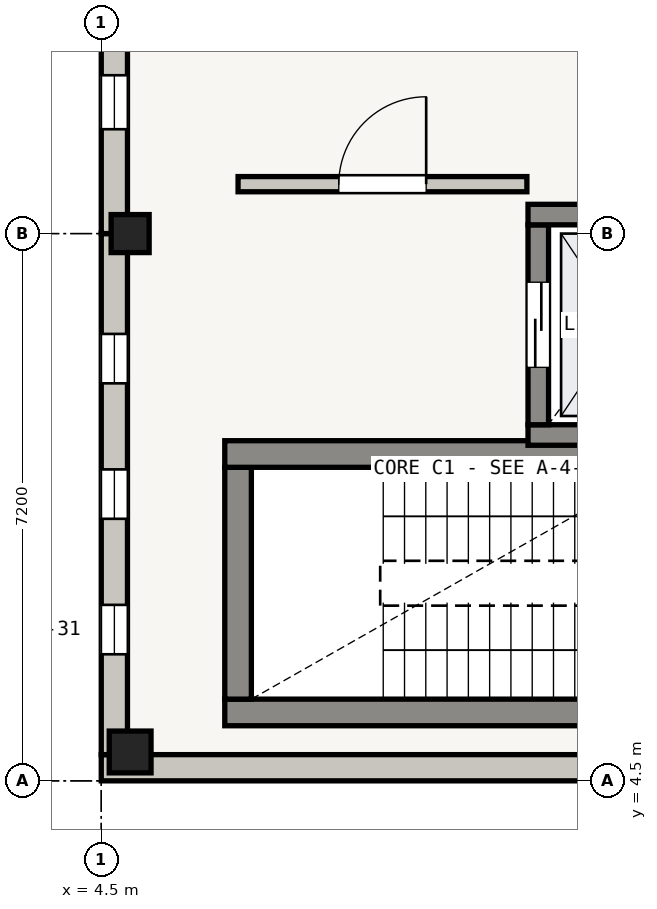
"""IFC4 building model, lengths in metres.
Left out: names, types, materials, properties, quantities, classifications, styles, units other than length and angle.
Written with IfcOpenShell. Run it as: python <this file> out.ifc"""

import sys

from ifc_helpers import new_model, si_unit, direction, frame, frame_2d, origin, origin_2d, place, context, subcontext, project, spatial, rectangle, extrude, element, fill, save


model = new_model("IFC4")
c1 = context("Model", 3, precision=1e-05, world=origin(), true_north=direction((0.0, 1.0)))
c2 = subcontext(c1, "Body", "Model", "MODEL_VIEW")
j1 = project(units=[si_unit("LENGTHUNIT", "METRE"), si_unit("PLANEANGLEUNIT", "RADIAN")], contexts=[c1])
p1 = place(None, origin())
s1 = spatial("IfcSite", under=j1, at=p1, CompositionType="ELEMENT")
p2 = place(p1, origin())
s2 = spatial("IfcBuilding", under=s1, at=p2, CompositionType="ELEMENT")
p3 = place(p2, frame((0.0, 0.0, 4.5)))
s3 = spatial("IfcBuildingStorey", under=s2, at=p3, CompositionType="ELEMENT", Elevation=4.5)
p4 = place(p3, frame((4.88, 4.88, 0.0), z_axis=(0.0, 0.0, 1.0), x_axis=(1.0, 0.0, 0.0)))
e1 = element("IfcColumn", 1, at=p4, inside=s3, PredefinedType="COLUMN", context=c2, shape_type="SweptSolid", body=[
    extrude(rectangle(XDim=0.55, YDim=0.55, at=origin_2d()), origin(), (0.0, 0.0, 1.0), 3.92),
])
p5 = place(p3, frame((4.88, 11.7, 0.0), z_axis=(0.0, 0.0, 1.0), x_axis=(1.0, 0.0, 0.0)))
e2 = element("IfcColumn", 2, at=p5, inside=s3, PredefinedType="COLUMN", context=c2, shape_type="SweptSolid", body=[
    extrude(rectangle(XDim=0.5, YDim=0.5, at=origin_2d()), origin(), (0.0, 0.0, 1.0), 3.92),
])
p6 = place(p3, frame((11.7, 4.673, 0.0), z_axis=(0.0, 0.0, 1.0), x_axis=(-1.0, 0.0, 0.0)))
e3 = element("IfcWall", 3, at=p6, inside=s3, PredefinedType="SOLIDWALL", context=c2, shape_type="SweptSolid", body=[
    extrude(rectangle(XDim=7.2, YDim=0.345, at=frame_2d((3.6, 0.0))), origin(), (0.0, 0.0, 1.0), 3.405),
])
p7 = place(p3, frame((4.673, 4.845, 0.0), z_axis=(0.0, 0.0, 1.0), x_axis=(0.0, 1.0, 0.0)))
e4 = element("IfcWall", 4, at=p7, inside=s3, PredefinedType="SOLIDWALL", context=c2, shape_type="SweptSolid", body=[
    extrude(rectangle(XDim=6.855, YDim=0.345, at=frame_2d((3.427, 0.0))), origin(), (0.0, 0.0, 1.0), 3.305),
])
p8 = place(p7, frame((1.32, 0.0, 0.55)))
e5 = element("IfcOpeningElement", 5, at=p8, cuts=e4, PredefinedType="OPENING", context=c2, shape_type="SweptSolid", body=[
    extrude(rectangle(XDim=0.65, YDim=2.14, at=frame_2d((0.325, 1.07))), frame((0.0, 0.172, 0.0), z_axis=(0.0, -1.0, 0.0), x_axis=(1.0, 0.0, 0.0)), (0.0, 0.0, 1.0), 0.345),
])
p9 = place(p7, frame((3.103, 0.0, 0.55)))
e6 = element("IfcOpeningElement", 6, at=p9, cuts=e4, PredefinedType="OPENING", context=c2, shape_type="SweptSolid", body=[
    extrude(rectangle(XDim=0.65, YDim=2.14, at=frame_2d((0.325, 1.07))), frame((0.0, 0.172, 0.0), z_axis=(0.0, -1.0, 0.0), x_axis=(1.0, 0.0, 0.0)), (0.0, 0.0, 1.0), 0.345),
])
p10 = place(p7, frame((4.885, 0.0, 0.55)))
e7 = element("IfcOpeningElement", 7, at=p10, cuts=e4, PredefinedType="OPENING", context=c2, shape_type="SweptSolid", body=[
    extrude(rectangle(XDim=0.65, YDim=2.14, at=frame_2d((0.325, 1.07))), frame((0.0, 0.172, 0.0), z_axis=(0.0, -1.0, 0.0), x_axis=(1.0, 0.0, 0.0)), (0.0, 0.0, 1.0), 0.345),
])
p11 = place(p3, frame((4.673, 11.7, 0.0), z_axis=(0.0, 0.0, 1.0), x_axis=(0.0, 1.0, 0.0)))
e8 = element("IfcWall", 8, at=p11, inside=s3, PredefinedType="SOLIDWALL", context=c2, shape_type="SweptSolid", body=[
    extrude(rectangle(XDim=7.2, YDim=0.345, at=frame_2d((3.6, 0.0))), origin(), (0.0, 0.0, 1.0), 3.305),
])
p12 = place(p11, frame((1.373, 0.0, 0.55)))
e9 = element("IfcOpeningElement", 9, at=p12, cuts=e8, PredefinedType="OPENING", context=c2, shape_type="SweptSolid", body=[
    extrude(rectangle(XDim=0.71, YDim=2.14, at=frame_2d((0.355, 1.07))), frame((0.0, 0.172, 0.0), z_axis=(0.0, -1.0, 0.0), x_axis=(1.0, 0.0, 0.0)), (0.0, 0.0, 1.0), 0.345),
])
p13 = place(p11, frame((2.495, 0.0, 0.55)))
e10 = element("IfcOpeningElement", 10, at=p13, cuts=e8, PredefinedType="OPENING", context=c2, shape_type="SweptSolid", body=[
    extrude(rectangle(XDim=0.71, YDim=2.14, at=frame_2d((0.355, 1.07))), frame((0.0, 0.172, 0.0), z_axis=(0.0, -1.0, 0.0), x_axis=(1.0, 0.0, 0.0)), (0.0, 0.0, 1.0), 0.345),
])
p14 = place(p3, frame((13.475, 5.4, 0.0), z_axis=(0.0, 0.0, 1.0), x_axis=(-1.0, 0.0, 0.0)))
e11 = element("IfcWall", 11, at=p14, inside=s3, PredefinedType="SHEAR", context=c2, shape_type="SweptSolid", body=[
    extrude(rectangle(XDim=7.35, YDim=0.35, at=frame_2d((3.675, 0.0))), origin(), (0.0, 0.0, 1.0), 3.92),
])
p15 = place(p3, frame((6.3, 5.575, 0.0), z_axis=(0.0, 0.0, 1.0), x_axis=(0.0, 1.0, 0.0)))
e12 = element("IfcWall", 12, at=p15, inside=s3, PredefinedType="SHEAR", context=c2, shape_type="SweptSolid", body=[
    extrude(rectangle(XDim=3.05, YDim=0.35, at=frame_2d((1.525, 0.0))), origin(), (0.0, 0.0, 1.0), 3.92),
])
p16 = place(p3, frame((6.125, 8.8, 0.0), z_axis=(0.0, 0.0, 1.0), x_axis=(1.0, 0.0, 0.0)))
e13 = element("IfcWall", 13, at=p16, inside=s3, PredefinedType="SHEAR", context=c2, shape_type="SweptSolid", body=[
    extrude(rectangle(XDim=7.35, YDim=0.35, at=frame_2d((3.675, 0.0))), origin(), (0.0, 0.0, 1.0), 3.92),
])
p17 = place(p3, frame((12.585, 9.05, 0.0), z_axis=(0.0, 0.0, 1.0), x_axis=(-1.0, 0.0, 0.0)))
e14 = element("IfcWall", 14, at=p17, inside=s3, PredefinedType="SHEAR", context=c2, shape_type="SweptSolid", body=[
    extrude(rectangle(XDim=2.47, YDim=0.27, at=frame_2d((1.235, 0.0))), origin(), (0.0, 0.0, 1.0), 3.92),
])
p18 = place(p3, frame((10.25, 9.185, 0.0), z_axis=(0.0, 0.0, 1.0), x_axis=(0.0, 1.0, 0.0)))
e15 = element("IfcWall", 15, at=p18, inside=s3, PredefinedType="SHEAR", context=c2, shape_type="SweptSolid", body=[
    extrude(rectangle(XDim=2.63, YDim=0.27, at=frame_2d((1.315, 0.0))), origin(), (0.0, 0.0, 1.0), 3.92),
])
p19 = place(p18, frame((0.755, 0.0, 0.0)))
e16 = element("IfcOpeningElement", 16, at=p19, cuts=e15, PredefinedType="OPENING", context=c2, shape_type="SweptSolid", body=[
    extrude(rectangle(XDim=1.12, YDim=2.1, at=frame_2d((0.56, 1.05))), frame((0.0, 0.135, 0.0), z_axis=(0.0, -1.0, 0.0), x_axis=(1.0, 0.0, 0.0)), (0.0, 0.0, 1.0), 0.27),
])
p20 = place(p3, frame((10.115, 11.95, 0.0), z_axis=(0.0, 0.0, 1.0), x_axis=(1.0, 0.0, 0.0)))
e17 = element("IfcWall", 17, at=p20, inside=s3, PredefinedType="SHEAR", context=c2, shape_type="SweptSolid", body=[
    extrude(rectangle(XDim=2.47, YDim=0.27, at=frame_2d((1.235, 0.0))), origin(), (0.0, 0.0, 1.0), 3.92),
])
p21 = place(p3, frame((6.3, 12.35, 0.0), z_axis=(0.0, 0.0, 1.0), x_axis=(1.0, 0.0, 0.0)))
e18 = element("IfcWall", 18, at=p21, inside=s3, PredefinedType="SOLIDWALL", context=c2, shape_type="SweptSolid", body=[
    extrude(rectangle(XDim=3.8, YDim=0.2, at=frame_2d((1.9, 0.0))), origin(), (0.0, 0.0, 1.0), 2.94),
])
p22 = place(p21, frame((1.325, 0.0, 0.0)))
e19 = element("IfcOpeningElement", 19, at=p22, cuts=e18, PredefinedType="OPENING", context=c2, shape_type="SweptSolid", body=[
    extrude(rectangle(XDim=1.15, YDim=2.05, at=frame_2d((0.575, 1.025))), frame((0.0, 0.1, 0.0), z_axis=(0.0, -1.0, 0.0), x_axis=(1.0, 0.0, 0.0)), (0.0, 0.0, 1.0), 0.2),
])
p23 = place(p8, origin())
e20 = element("IfcWindow", 20, at=p23, inside=s3, PartitioningType="SINGLE_PANEL", PredefinedType="WINDOW", context=c2, shape_type="SweptSolid", body=[
    extrude(rectangle(XDim=0.65, YDim=2.14, at=frame_2d((0.325, 1.07))), frame((0.0, 0.03, 0.0), z_axis=(0.0, -1.0, 0.0), x_axis=(1.0, 0.0, 0.0)), (0.0, 0.0, 1.0), 0.06),
])
fill(e5, e20)
p24 = place(p9, origin())
e21 = element("IfcWindow", 21, at=p24, inside=s3, PartitioningType="SINGLE_PANEL", PredefinedType="WINDOW", context=c2, shape_type="SweptSolid", body=[
    extrude(rectangle(XDim=0.65, YDim=2.14, at=frame_2d((0.325, 1.07))), frame((0.0, 0.03, 0.0), z_axis=(0.0, -1.0, 0.0), x_axis=(1.0, 0.0, 0.0)), (0.0, 0.0, 1.0), 0.06),
])
fill(e6, e21)
p25 = place(p10, origin())
e22 = element("IfcWindow", 22, at=p25, inside=s3, PartitioningType="SINGLE_PANEL", PredefinedType="WINDOW", context=c2, shape_type="SweptSolid", body=[
    extrude(rectangle(XDim=0.65, YDim=2.14, at=frame_2d((0.325, 1.07))), frame((0.0, 0.03, 0.0), z_axis=(0.0, -1.0, 0.0), x_axis=(1.0, 0.0, 0.0)), (0.0, 0.0, 1.0), 0.06),
])
fill(e7, e22)
p26 = place(p12, origin())
e23 = element("IfcWindow", 23, at=p26, inside=s3, PartitioningType="SINGLE_PANEL", PredefinedType="WINDOW", context=c2, shape_type="SweptSolid", body=[
    extrude(rectangle(XDim=0.71, YDim=2.14, at=frame_2d((0.355, 1.07))), frame((0.0, 0.03, 0.0), z_axis=(0.0, -1.0, 0.0), x_axis=(1.0, 0.0, 0.0)), (0.0, 0.0, 1.0), 0.06),
])
fill(e9, e23)
p27 = place(p19, origin())
e24 = element("IfcDoor", 24, at=p27, inside=s3, OperationType="DOUBLE_DOOR_SLIDING", PredefinedType="DOOR", context=c2, shape_type="SweptSolid", body=[
    extrude(rectangle(XDim=1.12, YDim=2.1, at=frame_2d((0.56, 1.05))), frame((0.0, 0.025, 0.0), z_axis=(0.0, -1.0, 0.0), x_axis=(1.0, 0.0, 0.0)), (0.0, 0.0, 1.0), 0.05),
])
fill(e16, e24)
p28 = place(p22, origin())
e25 = element("IfcDoor", 25, at=p28, inside=s3, OperationType="SINGLE_SWING_RIGHT", PredefinedType="DOOR", context=c2, shape_type="SweptSolid", body=[
    extrude(rectangle(XDim=1.15, YDim=2.05, at=frame_2d((0.575, 1.025))), frame((0.0, 0.025, 0.0), z_axis=(0.0, -1.0, 0.0), x_axis=(1.0, 0.0, 0.0)), (0.0, 0.0, 1.0), 0.05),
])
fill(e19, e25)
save(model, sys.argv[1])
